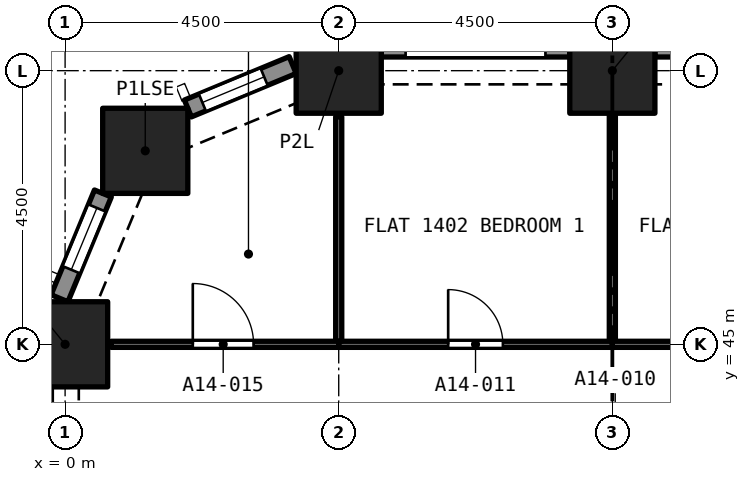
"""IFC4 building model, lengths in metres.
Left out: names, types, materials, properties, quantities, classifications, styles, units other than length and angle.
Written with IfcOpenShell. Run it as: python <this file> out.ifc"""

import sys

from ifc_helpers import new_model, si_unit, direction, frame, frame_2d, origin, origin_2d, place, context, subcontext, project, spatial, rectangle, extrude, element, fill, save


model = new_model("IFC4")
c1 = context("Model", 3, precision=1e-05, world=origin(), true_north=direction((0.0, 1.0)))
c2 = subcontext(c1, "Body", "Model", "MODEL_VIEW")
j1 = project(units=[si_unit("LENGTHUNIT", "METRE"), si_unit("PLANEANGLEUNIT", "RADIAN")], contexts=[c1])
p1 = place(None, origin())
s1 = spatial("IfcSite", under=j1, at=p1, CompositionType="ELEMENT")
p2 = place(p1, origin())
s2 = spatial("IfcBuilding", under=s1, at=p2, CompositionType="ELEMENT")
p3 = place(p2, frame((0.0, 0.0, 56.0)))
s3 = spatial("IfcBuildingStorey", under=s2, at=p3, CompositionType="ELEMENT", Elevation=56.0)
for number, where, z_axis, x_axis in (
    (1, (0.0, 45.0, 0.0), (0.0, 0.0, 1.0), (1.0, 0.0, 0.0)),
    (2, (1.318, 48.182, 0.0), (0.0, 0.0, 1.0), (1.0, 0.0, 0.0)),
    (3, (4.5, 49.5, 0.0), (0.0, 0.0, 1.0), (1.0, 0.0, 0.0)),
    (4, (9.0, 49.5, 0.0), (0.0, 0.0, 1.0), (1.0, 0.0, 0.0)),
):
    element("IfcColumn", number, at=place(p3, frame(where, z_axis=z_axis, x_axis=x_axis)), inside=s3, PredefinedType="COLUMN", context=c2, shape_type="SweptSolid", body=[
        extrude(rectangle(XDim=1.4, YDim=1.4, at=origin_2d()), origin(), (0.0, 0.0, 1.0), 3.2),
    ])
p4 = place(p3, frame((9.7, 49.875, 0.0), z_axis=(0.0, 0.0, 1.0), x_axis=(1.0, 0.0, 0.0)))
e5 = element("IfcWall", 5, at=p4, inside=s3, PredefinedType="SOLIDWALL", context=c2, shape_type="SweptSolid", body=[
    extrude(rectangle(XDim=3.1, YDim=0.3, at=frame_2d((1.55, 0.0))), origin(), (0.0, 0.0, 1.0), 3.2),
])
p5 = place(p4, frame((0.4, 0.0, 0.45)))
e6 = element("IfcOpeningElement", 6, at=p5, cuts=e5, PredefinedType="OPENING", context=c2, shape_type="SweptSolid", body=[
    extrude(rectangle(XDim=2.3, YDim=1.95, at=frame_2d((1.15, 0.975))), frame((0.0, 0.16, 0.0), z_axis=(0.0, -1.0, 0.0), x_axis=(1.0, 0.0, 0.0)), (0.0, 0.0, 1.0), 0.32),
])
p6 = place(p3, frame((5.2, 49.875, 0.0), z_axis=(0.0, 0.0, 1.0), x_axis=(1.0, 0.0, 0.0)))
e7 = element("IfcWall", 7, at=p6, inside=s3, PredefinedType="SOLIDWALL", context=c2, shape_type="SweptSolid", body=[
    extrude(rectangle(XDim=3.1, YDim=0.3, at=frame_2d((1.55, 0.0))), origin(), (0.0, 0.0, 1.0), 3.2),
])
p7 = place(p6, frame((0.4, 0.0, 0.45)))
e8 = element("IfcOpeningElement", 8, at=p7, cuts=e7, PredefinedType="OPENING", context=c2, shape_type="SweptSolid", body=[
    extrude(rectangle(XDim=2.3, YDim=1.95, at=frame_2d((1.15, 0.975))), frame((0.0, 0.16, 0.0), z_axis=(0.0, -1.0, 0.0), x_axis=(1.0, 0.0, 0.0)), (0.0, 0.0, 1.0), 0.32),
])
p8 = place(p3, frame((2.02, 48.878, 0.0), z_axis=(0.0, 0.0, 1.0), x_axis=(0.923903565336, 0.38262540684, 0.0)))
e9 = element("IfcWall", 9, at=p8, inside=s3, PredefinedType="SOLIDWALL", context=c2, shape_type="SweptSolid", body=[
    extrude(rectangle(XDim=1.865, YDim=0.3, at=frame_2d((0.933, 0.0))), origin(), (0.0, 0.0, 1.0), 3.2),
])
p9 = place(p8, frame((0.258, 0.0, 0.45)))
e10 = element("IfcOpeningElement", 10, at=p9, cuts=e9, PredefinedType="OPENING", context=c2, shape_type="SweptSolid", body=[
    extrude(rectangle(XDim=1.1, YDim=1.95, at=frame_2d((0.55, 0.975))), frame((0.0, 0.16, 0.0), z_axis=(0.0, -1.0, 0.0), x_axis=(1.0, 0.0, 0.0)), (0.0, 0.0, 1.0), 0.32),
])
p10 = place(p3, frame((-0.092, 45.757, 0.0), z_axis=(0.0, 0.0, 1.0), x_axis=(0.382737135771, 0.923857286003, 0.0)))
e11 = element("IfcWall", 11, at=p10, inside=s3, PredefinedType="SOLIDWALL", context=c2, shape_type="SweptSolid", body=[
    extrude(rectangle(XDim=1.865, YDim=0.3, at=frame_2d((0.933, 0.0))), origin(), (0.0, 0.0, 1.0), 3.2),
])
p11 = place(p10, frame((0.508, 0.0, 0.45)))
e12 = element("IfcOpeningElement", 12, at=p11, cuts=e11, PredefinedType="OPENING", context=c2, shape_type="SweptSolid", body=[
    extrude(rectangle(XDim=1.1, YDim=1.95, at=frame_2d((0.55, 0.975))), frame((0.0, 0.16, 0.0), z_axis=(0.0, -1.0, 0.0), x_axis=(1.0, 0.0, 0.0)), (0.0, 0.0, 1.0), 0.32),
])
p12 = place(p3, frame((9.0, 45.05, 0.0), z_axis=(0.0, 0.0, 1.0), x_axis=(0.0, 1.0, 0.0)))
e13 = element("IfcWall", 13, at=p12, inside=s3, PredefinedType="PARTITIONING", context=c2, shape_type="SweptSolid", body=[
    extrude(rectangle(XDim=3.75, YDim=0.1, at=frame_2d((1.875, 0.0))), origin(), (0.0, 0.0, 1.0), 2.9),
])
p13 = place(p3, frame((4.5, 45.0, 0.0), z_axis=(0.0, 0.0, 1.0), x_axis=(1.0, 0.0, 0.0)))
e14 = element("IfcWall", 14, at=p13, inside=s3, PredefinedType="PARTITIONING", context=c2, shape_type="SweptSolid", body=[
    extrude(rectangle(XDim=4.5, YDim=0.1, at=frame_2d((2.25, 0.0))), origin(), (0.0, 0.0, 1.0), 2.9),
])
p14 = place(p13, frame((1.8, 0.0, 0.0)))
e15 = element("IfcOpeningElement", 15, at=p14, cuts=e14, PredefinedType="OPENING", context=c2, shape_type="SweptSolid", body=[
    extrude(rectangle(XDim=0.9, YDim=2.1, at=frame_2d((0.45, 1.05))), frame((0.0, 0.06, 0.0), z_axis=(0.0, -1.0, 0.0), x_axis=(1.0, 0.0, 0.0)), (0.0, 0.0, 1.0), 0.12),
])
p15 = place(p3, frame((4.5, 45.05, 0.0), z_axis=(0.0, 0.0, 1.0), x_axis=(0.0, 1.0, 0.0)))
e16 = element("IfcWall", 16, at=p15, inside=s3, PredefinedType="PARTITIONING", context=c2, shape_type="SweptSolid", body=[
    extrude(rectangle(XDim=3.692, YDim=0.1, at=frame_2d((1.846, 0.0))), origin(), (0.0, 0.0, 1.0), 2.9),
])
p16 = place(p3, frame((9.0, 45.0, 0.0), z_axis=(0.0, 0.0, 1.0), x_axis=(1.0, 0.0, 0.0)))
e17 = element("IfcWall", 17, at=p16, inside=s3, PredefinedType="PARTITIONING", context=c2, shape_type="SweptSolid", body=[
    extrude(rectangle(XDim=4.5, YDim=0.1, at=frame_2d((2.25, 0.0))), origin(), (0.0, 0.0, 1.0), 2.9),
])
p17 = place(p16, frame((1.8, 0.0, 0.0)))
e18 = element("IfcOpeningElement", 18, at=p17, cuts=e17, PredefinedType="OPENING", context=c2, shape_type="SweptSolid", body=[
    extrude(rectangle(XDim=0.9, YDim=2.1, at=frame_2d((0.45, 1.05))), frame((0.0, 0.06, 0.0), z_axis=(0.0, -1.0, 0.0), x_axis=(1.0, 0.0, 0.0)), (0.0, 0.0, 1.0), 0.12),
])
p18 = place(p3, frame((0.758, 45.0, 0.0), z_axis=(0.0, 0.0, 1.0), x_axis=(1.0, 0.0, 0.0)))
e19 = element("IfcWall", 19, at=p18, inside=s3, PredefinedType="PARTITIONING", context=c2, shape_type="SweptSolid", body=[
    extrude(rectangle(XDim=3.742, YDim=0.1, at=frame_2d((1.871, 0.0))), origin(), (0.0, 0.0, 1.0), 2.9),
])
p19 = place(p18, frame((1.342, 0.0, 0.0)))
e20 = element("IfcOpeningElement", 20, at=p19, cuts=e19, PredefinedType="OPENING", context=c2, shape_type="SweptSolid", body=[
    extrude(rectangle(XDim=1.0, YDim=2.1, at=frame_2d((0.5, 1.05))), frame((0.0, 0.06, 0.0), z_axis=(0.0, -1.0, 0.0), x_axis=(1.0, 0.0, 0.0)), (0.0, 0.0, 1.0), 0.12),
])
p20 = place(p9, origin())
e21 = element("IfcWindow", 21, at=p20, inside=s3, PartitioningType="SINGLE_PANEL", PredefinedType="WINDOW", context=c2, shape_type="SweptSolid", body=[
    extrude(rectangle(XDim=1.1, YDim=1.95, at=frame_2d((0.55, 0.975))), frame((0.0, 0.03, 0.0), z_axis=(0.0, -1.0, 0.0), x_axis=(1.0, 0.0, 0.0)), (0.0, 0.0, 1.0), 0.06),
])
fill(e10, e21)
p21 = place(p11, origin())
e22 = element("IfcWindow", 22, at=p21, inside=s3, PartitioningType="SINGLE_PANEL", PredefinedType="WINDOW", context=c2, shape_type="SweptSolid", body=[
    extrude(rectangle(XDim=1.1, YDim=1.95, at=frame_2d((0.55, 0.975))), frame((0.0, 0.03, 0.0), z_axis=(0.0, -1.0, 0.0), x_axis=(1.0, 0.0, 0.0)), (0.0, 0.0, 1.0), 0.06),
])
fill(e12, e22)
p22 = place(p14, origin())
e23 = element("IfcDoor", 23, at=p22, inside=s3, OperationType="SINGLE_SWING_RIGHT", PredefinedType="DOOR", context=c2, shape_type="SweptSolid", body=[
    extrude(rectangle(XDim=0.9, YDim=2.1, at=frame_2d((0.45, 1.05))), frame((0.0, 0.025, 0.0), z_axis=(0.0, -1.0, 0.0), x_axis=(1.0, 0.0, 0.0)), (0.0, 0.0, 1.0), 0.05),
])
fill(e15, e23)
p23 = place(p19, origin())
e24 = element("IfcDoor", 24, at=p23, inside=s3, OperationType="SINGLE_SWING_LEFT", PredefinedType="DOOR", context=c2, shape_type="SweptSolid", body=[
    extrude(rectangle(XDim=1.0, YDim=2.1, at=frame_2d((0.5, 1.05))), frame((0.0, 0.025, 0.0), z_axis=(0.0, -1.0, 0.0), x_axis=(1.0, 0.0, 0.0)), (0.0, 0.0, 1.0), 0.05),
])
fill(e20, e24)
save(model, sys.argv[1])
